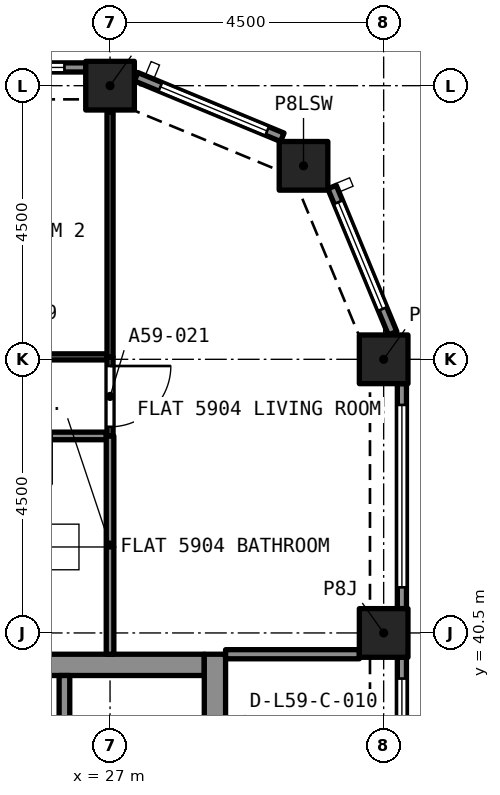
"""IFC4 building model, lengths in metres.
Left out: names, types, materials, properties, quantities, classifications, styles, units other than length and angle.
Written with IfcOpenShell. Run it as: python <this file> out.ifc"""

import sys

from ifc_helpers import new_model, si_unit, direction, frame, frame_2d, origin, origin_2d, place, context, subcontext, project, spatial, rectangle, extrude, element, fill, save


model = new_model("IFC4")
c1 = context("Model", 3, precision=1e-05, world=origin(), true_north=direction((0.0, 1.0)))
c2 = subcontext(c1, "Body", "Model", "MODEL_VIEW")
j1 = project(units=[si_unit("LENGTHUNIT", "METRE"), si_unit("PLANEANGLEUNIT", "RADIAN")], contexts=[c1])
p1 = place(None, origin())
s1 = spatial("IfcSite", under=j1, at=p1, CompositionType="ELEMENT")
p2 = place(p1, origin())
s2 = spatial("IfcBuilding", under=s1, at=p2, CompositionType="ELEMENT")
p3 = place(p2, frame((0.0, 0.0, 213.295)))
s3 = spatial("IfcBuildingStorey", under=s2, at=p3, CompositionType="ELEMENT", Elevation=213.295)
for number, where, z_axis, x_axis in (
    (1, (31.5, 40.5, 0.0), (0.0, 0.0, 1.0), (1.0, 0.0, 0.0)),
    (2, (31.5, 45.0, 0.0), (0.0, 0.0, 1.0), (1.0, 0.0, 0.0)),
    (3, (30.182, 48.182, 0.0), (0.0, 0.0, 1.0), (1.0, 0.0, 0.0)),
    (4, (27.0, 49.5, 0.0), (0.0, 0.0, 1.0), (1.0, 0.0, 0.0)),
):
    element("IfcColumn", number, at=place(p3, frame(where, z_axis=z_axis, x_axis=x_axis)), inside=s3, PredefinedType="COLUMN", context=c2, shape_type="SweptSolid", body=[
        extrude(rectangle(XDim=0.8, YDim=0.8, at=origin_2d()), origin(), (0.0, 0.0, 1.0), 3.2),
    ])
p4 = place(p3, frame((20.95, 39.975, 0.0), z_axis=(0.0, 0.0, 1.0), x_axis=(1.0, 0.0, 0.0)))
e5 = element("IfcWall", 5, at=p4, inside=s3, PredefinedType="SOLIDWALL", context=c2, shape_type="SweptSolid", body=[
    extrude(rectangle(XDim=7.6, YDim=0.35, at=frame_2d((3.8, 0.0))), origin(), (0.0, 0.0, 1.0), 3.2),
])
p5 = place(p3, frame((28.725, 27.35, 0.0), z_axis=(0.0, 0.0, 1.0), x_axis=(0.0, 1.0, 0.0)))
e6 = element("IfcWall", 6, at=p5, inside=s3, PredefinedType="SOLIDWALL", context=c2, shape_type="SweptSolid", body=[
    extrude(rectangle(XDim=12.8, YDim=0.35, at=frame_2d((6.4, 0.0))), origin(), (0.0, 0.0, 1.0), 3.2),
])
p6 = place(p5, frame((8.6, 0.0, 0.0)))
e7 = element("IfcOpeningElement", 7, at=p6, cuts=e6, PredefinedType="OPENING", context=c2, shape_type="SweptSolid", body=[
    extrude(rectangle(XDim=1.2, YDim=2.1, at=frame_2d((0.6, 1.05))), frame((0.0, 0.185, 0.0), z_axis=(0.0, -1.0, 0.0), x_axis=(1.0, 0.0, 0.0)), (0.0, 0.0, 1.0), 0.37),
])
p7 = place(p3, frame((31.8, 40.1, 0.0), z_axis=(0.0, 0.0, 1.0), x_axis=(0.0, -1.0, 0.0)))
e8 = element("IfcWall", 8, at=p7, inside=s3, PredefinedType="SOLIDWALL", context=c2, shape_type="SweptSolid", body=[
    extrude(rectangle(XDim=3.7, YDim=0.15, at=frame_2d((1.85, 0.0))), origin(), (0.0, 0.0, 1.0), 3.2),
])
p8 = place(p7, frame((0.35, 0.0, 0.45)))
e9 = element("IfcOpeningElement", 9, at=p8, cuts=e8, PredefinedType="OPENING", context=c2, shape_type="SweptSolid", body=[
    extrude(rectangle(XDim=3.0, YDim=1.95, at=frame_2d((1.5, 0.975))), frame((0.0, 0.085, 0.0), z_axis=(0.0, -1.0, 0.0), x_axis=(1.0, 0.0, 0.0)), (0.0, 0.0, 1.0), 0.17),
])
p9 = place(p3, frame((31.8, 44.6, 0.0), z_axis=(0.0, 0.0, 1.0), x_axis=(0.0, -1.0, 0.0)))
e10 = element("IfcWall", 10, at=p9, inside=s3, PredefinedType="SOLIDWALL", context=c2, shape_type="SweptSolid", body=[
    extrude(rectangle(XDim=3.7, YDim=0.15, at=frame_2d((1.85, 0.0))), origin(), (0.0, 0.0, 1.0), 3.2),
])
p10 = place(p9, frame((0.35, 0.0, 0.45)))
e11 = element("IfcOpeningElement", 11, at=p10, cuts=e10, PredefinedType="OPENING", context=c2, shape_type="SweptSolid", body=[
    extrude(rectangle(XDim=3.0, YDim=1.95, at=frame_2d((1.5, 0.975))), frame((0.0, 0.085, 0.0), z_axis=(0.0, -1.0, 0.0), x_axis=(1.0, 0.0, 0.0)), (0.0, 0.0, 1.0), 0.17),
])
p11 = place(p3, frame((30.651, 47.833, 0.0), z_axis=(0.0, 0.0, 1.0), x_axis=(0.382669406082, -0.923885342263, 0.0)))
e12 = element("IfcWall", 12, at=p11, inside=s3, PredefinedType="SOLIDWALL", context=c2, shape_type="SweptSolid", body=[
    extrude(rectangle(XDim=2.602, YDim=0.15, at=frame_2d((1.301, 0.0))), origin(), (0.0, 0.0, 1.0), 3.2),
])
p12 = place(p11, frame((0.27, 0.0, 0.45)))
e13 = element("IfcOpeningElement", 13, at=p12, cuts=e12, PredefinedType="OPENING", context=c2, shape_type="SweptSolid", body=[
    extrude(rectangle(XDim=1.9, YDim=1.95, at=frame_2d((0.95, 0.975))), frame((0.0, 0.085, 0.0), z_axis=(0.0, -1.0, 0.0), x_axis=(1.0, 0.0, 0.0)), (0.0, 0.0, 1.0), 0.17),
])
p13 = place(p3, frame((27.429, 49.647, 0.0), z_axis=(0.0, 0.0, 1.0), x_axis=(0.923885342263, -0.382669406082, 0.0)))
e14 = element("IfcWall", 14, at=p13, inside=s3, PredefinedType="SOLIDWALL", context=c2, shape_type="SweptSolid", body=[
    extrude(rectangle(XDim=2.602, YDim=0.15, at=frame_2d((1.301, 0.0))), origin(), (0.0, 0.0, 1.0), 3.2),
])
p14 = place(p13, frame((0.432, 0.0, 0.45)))
e15 = element("IfcOpeningElement", 15, at=p14, cuts=e14, PredefinedType="OPENING", context=c2, shape_type="SweptSolid", body=[
    extrude(rectangle(XDim=1.9, YDim=1.95, at=frame_2d((0.95, 0.975))), frame((0.0, 0.085, 0.0), z_axis=(0.0, -1.0, 0.0), x_axis=(1.0, 0.0, 0.0)), (0.0, 0.0, 1.0), 0.17),
])
p15 = place(p3, frame((22.9, 49.8, 0.0), z_axis=(0.0, 0.0, 1.0), x_axis=(1.0, 0.0, 0.0)))
e16 = element("IfcWall", 16, at=p15, inside=s3, PredefinedType="SOLIDWALL", context=c2, shape_type="SweptSolid", body=[
    extrude(rectangle(XDim=3.7, YDim=0.15, at=frame_2d((1.85, 0.0))), origin(), (0.0, 0.0, 1.0), 3.2),
])
p16 = place(p15, frame((0.35, 0.0, 0.45)))
e17 = element("IfcOpeningElement", 17, at=p16, cuts=e16, PredefinedType="OPENING", context=c2, shape_type="SweptSolid", body=[
    extrude(rectangle(XDim=3.0, YDim=1.95, at=frame_2d((1.5, 0.975))), frame((0.0, 0.085, 0.0), z_axis=(0.0, -1.0, 0.0), x_axis=(1.0, 0.0, 0.0)), (0.0, 0.0, 1.0), 0.17),
])
p17 = place(p3, frame((26.938, 43.74, 0.0), z_axis=(0.0, 0.0, 1.0), x_axis=(-1.0, 0.0, 0.0)))
e18 = element("IfcWall", 18, at=p17, inside=s3, PredefinedType="PARTITIONING", context=c2, shape_type="SweptSolid", body=[
    extrude(rectangle(XDim=2.659, YDim=0.125, at=frame_2d((1.33, 0.0))), origin(), (0.0, 0.0, 1.0), 2.75),
])
p18 = place(p17, frame((0.898, 0.0, 0.0)))
e19 = element("IfcOpeningElement", 19, at=p18, cuts=e18, PredefinedType="OPENING", context=c2, shape_type="SweptSolid", body=[
    extrude(rectangle(XDim=0.8, YDim=2.1, at=frame_2d((0.4, 1.05))), frame((0.0, 0.073, 0.0), z_axis=(0.0, -1.0, 0.0), x_axis=(1.0, 0.0, 0.0)), (0.0, 0.0, 1.0), 0.145),
])
p19 = place(p3, frame((27.0, 40.15, 0.0), z_axis=(0.0, 0.0, 1.0), x_axis=(0.0, 1.0, 0.0)))
e20 = element("IfcWall", 20, at=p19, inside=s3, PredefinedType="PARTITIONING", context=c2, shape_type="SweptSolid", body=[
    extrude(rectangle(XDim=3.59, YDim=0.125, at=frame_2d((1.795, 0.0))), origin(), (0.0, 0.0, 1.0), 2.75),
])
p20 = place(p3, frame((22.5, 45.04, 0.0), z_axis=(0.0, 0.0, 1.0), x_axis=(1.0, 0.0, 0.0)))
e21 = element("IfcWall", 21, at=p20, inside=s3, PredefinedType="PARTITIONING", context=c2, shape_type="SweptSolid", body=[
    extrude(rectangle(XDim=4.45, YDim=0.1, at=frame_2d((2.225, 0.0))), origin(), (0.0, 0.0, 1.0), 2.75),
])
p21 = place(p20, frame((1.8, 0.0, 0.0)))
e22 = element("IfcOpeningElement", 22, at=p21, cuts=e21, PredefinedType="OPENING", context=c2, shape_type="SweptSolid", body=[
    extrude(rectangle(XDim=0.9, YDim=2.1, at=frame_2d((0.45, 1.05))), frame((0.0, 0.06, 0.0), z_axis=(0.0, -1.0, 0.0), x_axis=(1.0, 0.0, 0.0)), (0.0, 0.0, 1.0), 0.12),
])
p22 = place(p3, frame((27.0, 45.04, 0.0), z_axis=(0.0, 0.0, 1.0), x_axis=(0.0, 1.0, 0.0)))
e23 = element("IfcWall", 23, at=p22, inside=s3, PredefinedType="PARTITIONING", context=c2, shape_type="SweptSolid", body=[
    extrude(rectangle(XDim=4.027, YDim=0.1, at=frame_2d((2.014, 0.0))), origin(), (0.0, 0.0, 1.0), 2.75),
])
p23 = place(p3, frame((27.0, 45.04, 0.0), z_axis=(0.0, 0.0, 1.0), x_axis=(0.0, -1.0, 0.0)))
e24 = element("IfcWall", 24, at=p23, inside=s3, PredefinedType="PARTITIONING", context=c2, shape_type="SweptSolid", body=[
    extrude(rectangle(XDim=1.3, YDim=0.1, at=frame_2d((0.65, 0.0))), origin(), (0.0, 0.0, 1.0), 2.75),
])
p24 = place(p23, frame((0.15, 0.0, 0.0)))
e25 = element("IfcOpeningElement", 25, at=p24, cuts=e24, PredefinedType="OPENING", context=c2, shape_type="SweptSolid", body=[
    extrude(rectangle(XDim=1.0, YDim=2.1, at=frame_2d((0.5, 1.05))), frame((0.0, 0.06, 0.0), z_axis=(0.0, -1.0, 0.0), x_axis=(1.0, 0.0, 0.0)), (0.0, 0.0, 1.0), 0.12),
])
p25 = place(p3, frame((28.9, 40.15, 0.0), z_axis=(0.0, 0.0, 1.0), x_axis=(1.0, 0.0, 0.0)))
e26 = element("IfcWall", 26, at=p25, inside=s3, PredefinedType="PARTITIONING", context=c2, shape_type="SweptSolid", body=[
    extrude(rectangle(XDim=2.2, YDim=0.15, at=frame_2d((1.1, 0.0))), origin(), (0.0, 0.0, 1.0), 2.75),
])
p26 = place(p3, frame((26.25, 37.5, 0.0), z_axis=(0.0, 0.0, 1.0), x_axis=(0.0, 1.0, 0.0)))
e27 = element("IfcWall", 27, at=p26, inside=s3, PredefinedType="SOLIDWALL", context=c2, shape_type="SweptSolid", body=[
    extrude(rectangle(XDim=2.3, YDim=0.175, at=frame_2d((1.15, 0.0))), origin(), (0.0, 0.0, 1.0), 2.9),
])
p27 = place(p8, origin())
e28 = element("IfcWindow", 28, at=p27, inside=s3, PartitioningType="SINGLE_PANEL", PredefinedType="WINDOW", context=c2, shape_type="SweptSolid", body=[
    extrude(rectangle(XDim=3.0, YDim=1.95, at=frame_2d((1.5, 0.975))), frame((0.0, 0.03, 0.0), z_axis=(0.0, -1.0, 0.0), x_axis=(1.0, 0.0, 0.0)), (0.0, 0.0, 1.0), 0.06),
])
fill(e9, e28)
p28 = place(p10, origin())
e29 = element("IfcWindow", 29, at=p28, inside=s3, PartitioningType="SINGLE_PANEL", PredefinedType="WINDOW", context=c2, shape_type="SweptSolid", body=[
    extrude(rectangle(XDim=3.0, YDim=1.95, at=frame_2d((1.5, 0.975))), frame((0.0, 0.03, 0.0), z_axis=(0.0, -1.0, 0.0), x_axis=(1.0, 0.0, 0.0)), (0.0, 0.0, 1.0), 0.06),
])
fill(e11, e29)
p29 = place(p12, origin())
e30 = element("IfcWindow", 30, at=p29, inside=s3, PartitioningType="SINGLE_PANEL", PredefinedType="WINDOW", context=c2, shape_type="SweptSolid", body=[
    extrude(rectangle(XDim=1.9, YDim=1.95, at=frame_2d((0.95, 0.975))), frame((0.0, 0.03, 0.0), z_axis=(0.0, -1.0, 0.0), x_axis=(1.0, 0.0, 0.0)), (0.0, 0.0, 1.0), 0.06),
])
fill(e13, e30)
p30 = place(p14, origin())
e31 = element("IfcWindow", 31, at=p30, inside=s3, PartitioningType="SINGLE_PANEL", PredefinedType="WINDOW", context=c2, shape_type="SweptSolid", body=[
    extrude(rectangle(XDim=1.9, YDim=1.95, at=frame_2d((0.95, 0.975))), frame((0.0, 0.03, 0.0), z_axis=(0.0, -1.0, 0.0), x_axis=(1.0, 0.0, 0.0)), (0.0, 0.0, 1.0), 0.06),
])
fill(e15, e31)
p31 = place(p16, origin())
e32 = element("IfcWindow", 32, at=p31, inside=s3, PartitioningType="SINGLE_PANEL", PredefinedType="WINDOW", context=c2, shape_type="SweptSolid", body=[
    extrude(rectangle(XDim=3.0, YDim=1.95, at=frame_2d((1.5, 0.975))), frame((0.0, 0.03, 0.0), z_axis=(0.0, -1.0, 0.0), x_axis=(1.0, 0.0, 0.0)), (0.0, 0.0, 1.0), 0.06),
])
fill(e17, e32)
p32 = place(p24, origin())
e33 = element("IfcDoor", 33, at=p32, inside=s3, OperationType="SINGLE_SWING_RIGHT", PredefinedType="DOOR", context=c2, shape_type="SweptSolid", body=[
    extrude(rectangle(XDim=1.0, YDim=2.1, at=frame_2d((0.5, 1.05))), frame((0.0, 0.025, 0.0), z_axis=(0.0, -1.0, 0.0), x_axis=(1.0, 0.0, 0.0)), (0.0, 0.0, 1.0), 0.05),
])
fill(e25, e33)
save(model, sys.argv[1])
